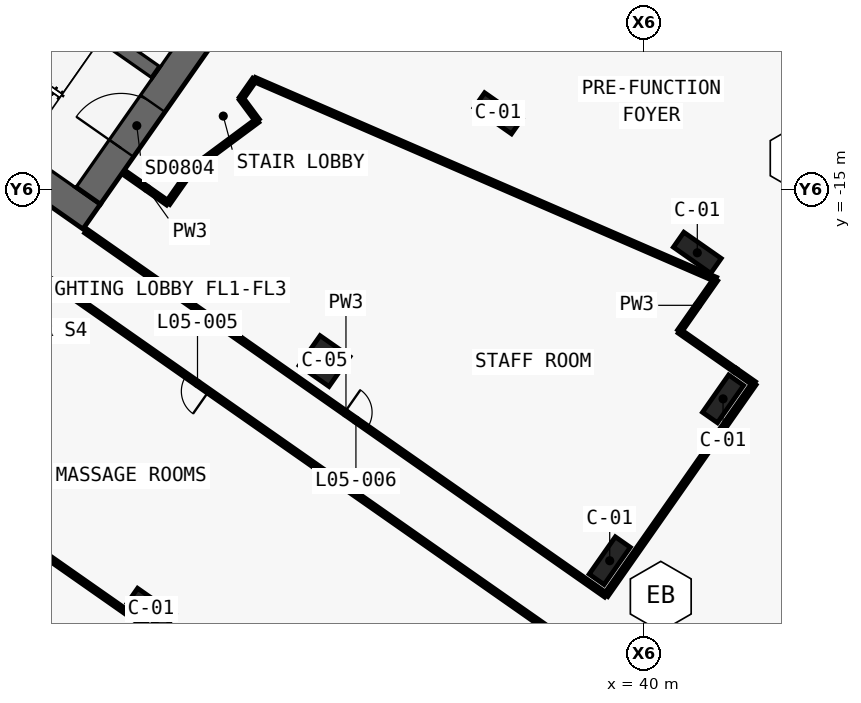
"""IFC4 building model, lengths in metres.
Left out: names, types, materials, properties, quantities, classifications, styles, units other than length and angle.
Written with IfcOpenShell. Run it as: python <this file> out.ifc"""

import sys

from ifc_helpers import new_model, si_unit, direction, frame, frame_2d, origin, origin_2d, place, context, subcontext, project, spatial, polyline, rectangle, outline, extrude, element, fill, save


model = new_model("IFC4")
c1 = context("Model", 3, precision=1e-05, world=origin(), true_north=direction((0.0, 1.0)))
c2 = subcontext(c1, "Body", "Model", "MODEL_VIEW")
j1 = project(units=[si_unit("LENGTHUNIT", "METRE"), si_unit("PLANEANGLEUNIT", "RADIAN")], contexts=[c1])
p1 = place(None, origin())
s1 = spatial("IfcSite", under=j1, at=p1, CompositionType="ELEMENT")
p2 = place(p1, origin())
s2 = spatial("IfcBuilding", under=s1, at=p2, CompositionType="ELEMENT")
p3 = place(p2, frame((0.0, 0.0, 37.5)))
s3 = spatial("IfcBuildingStorey", under=s2, at=p3, CompositionType="ELEMENT", Elevation=37.5)
p4 = place(p3, frame((-0.037, -0.585, 0.0), z_axis=(0.0, 0.0, 1.0), x_axis=(0.819157152511, -0.573569140985, 0.0)))
e1 = element("IfcWall", 1, at=p4, inside=s3, PredefinedType="SHEAR", context=c2, shape_type="SweptSolid", body=[
    extrude(outline(polyline([(26.695, 0.5), (0.0, 0.5), (0.7, -0.5), (26.695, -0.5), (26.695, 0.5)])), origin(), (0.0, 0.0, 1.0), 5.5),
])
p5 = place(p4, frame((6.695, 0.0, 0.0)))
e2 = element("IfcOpeningElement", 2, at=p5, cuts=e1, PredefinedType="OPENING", context=c2, shape_type="SweptSolid", body=[
    extrude(rectangle(XDim=1.5, YDim=2.1, at=frame_2d((0.75, 1.05))), frame((0.0, 0.51, 0.0), z_axis=(0.0, -1.0, 0.0), x_axis=(1.0, 0.0, 0.0)), (0.0, 0.0, 1.0), 1.02),
])
p6 = place(p4, frame((12.445, 0.0, 0.0)))
e3 = element("IfcOpeningElement", 3, at=p6, cuts=e1, PredefinedType="OPENING", context=c2, shape_type="SweptSolid", body=[
    extrude(rectangle(XDim=1.5, YDim=2.1, at=frame_2d((0.75, 1.05))), frame((0.0, 0.51, 0.0), z_axis=(0.0, -1.0, 0.0), x_axis=(1.0, 0.0, 0.0)), (0.0, 0.0, 1.0), 1.02),
])
p7 = place(p3, frame((21.708, -15.2, 0.0), z_axis=(0.0, 0.0, 1.0), x_axis=(0.573576324356, 0.819152122709, 0.0)))
e4 = element("IfcWall", 4, at=p7, inside=s3, PredefinedType="SHEAR", context=c2, shape_type="SweptSolid", body=[
    extrude(outline(polyline([(9.2, 0.5), (0.0, 0.5), (0.0, -0.5), (9.2, -0.5), (9.2, 0.5)])), origin(), (0.0, 0.0, 1.0), 5.5),
])
p8 = place(p7, frame((6.1, 0.0, 0.0)))
e5 = element("IfcOpeningElement", 5, at=p8, cuts=e4, PredefinedType="OPENING", context=c2, shape_type="SweptSolid", body=[
    extrude(rectangle(XDim=1.8, YDim=2.1, at=frame_2d((0.9, 1.05))), frame((0.0, 0.51, 0.0), z_axis=(0.0, -1.0, 0.0), x_axis=(1.0, 0.0, 0.0)), (0.0, 0.0, 1.0), 1.02),
])
p9 = place(p7, frame((1.9, 0.0, 0.0)))
e6 = element("IfcOpeningElement", 6, at=p9, cuts=e4, PredefinedType="OPENING", context=c2, shape_type="SweptSolid", body=[
    extrude(rectangle(XDim=1.8, YDim=2.1, at=frame_2d((0.9, 1.05))), frame((0.0, 0.51, 0.0), z_axis=(0.0, -1.0, 0.0), x_axis=(1.0, 0.0, 0.0)), (0.0, 0.0, 1.0), 1.02),
])
p10 = place(p3, frame((2.638, 3.768, 0.0), z_axis=(0.0, 0.0, 1.0), x_axis=(0.819148977158, -0.573580816643, 0.0)))
e7 = element("IfcWall", 7, at=p10, inside=s3, PredefinedType="SHEAR", context=c2, shape_type="SweptSolid", body=[
    extrude(outline(polyline([(0.0, 0.25), (0.0, -0.25), (26.0, -0.25), (26.0, 0.25), (0.0, 0.25)])), origin(), (0.0, 0.0, 1.0), 5.5),
])
p11 = place(p10, frame((9.637, 0.0, 0.0)))
e8 = element("IfcOpeningElement", 8, at=p11, cuts=e7, PredefinedType="OPENING", context=c2, shape_type="SweptSolid", body=[
    extrude(rectangle(XDim=1.2, YDim=2.1, at=frame_2d((0.6, 1.05))), frame((0.0, 0.26, 0.0), z_axis=(0.0, -1.0, 0.0), x_axis=(1.0, 0.0, 0.0)), (0.0, 0.0, 1.0), 0.52),
])
p12 = place(p10, frame((11.812, 0.0, 0.0)))
e9 = element("IfcOpeningElement", 9, at=p12, cuts=e7, PredefinedType="OPENING", context=c2, shape_type="SweptSolid", body=[
    extrude(rectangle(XDim=1.2, YDim=2.1, at=frame_2d((0.6, 1.05))), frame((0.0, 0.26, 0.0), z_axis=(0.0, -1.0, 0.0), x_axis=(1.0, 0.0, 0.0)), (0.0, 0.0, 1.0), 0.52),
])
p13 = place(p10, frame((13.988, 0.0, 0.0)))
e10 = element("IfcOpeningElement", 10, at=p13, cuts=e7, PredefinedType="OPENING", context=c2, shape_type="SweptSolid", body=[
    extrude(rectangle(XDim=1.2, YDim=2.1, at=frame_2d((0.6, 1.05))), frame((0.0, 0.26, 0.0), z_axis=(0.0, -1.0, 0.0), x_axis=(1.0, 0.0, 0.0)), (0.0, 0.0, 1.0), 0.52),
])
p14 = place(p10, frame((16.262, 0.0, 0.0)))
e11 = element("IfcOpeningElement", 11, at=p14, cuts=e7, PredefinedType="OPENING", context=c2, shape_type="SweptSolid", body=[
    extrude(rectangle(XDim=1.0, YDim=2.1, at=frame_2d((0.5, 1.05))), frame((0.0, 0.26, 0.0), z_axis=(0.0, -1.0, 0.0), x_axis=(1.0, 0.0, 0.0)), (0.0, 0.0, 1.0), 0.52),
])
for number, where, z_axis, x_axis in (
    (12, (23.782, -28.799, 0.0), (0.0, 0.0, 1.0), (0.819, -0.574, 0.0)),
    (13, (35.197, -12.498, 0.0), (0.0, 0.0, 1.0), (0.819, -0.574, 0.0)),
    (14, (41.75, -17.087, 0.0), (0.0, 0.0, 1.0), (0.819, -0.574, 0.0)),
    (15, (38.869, -27.216, 0.0), (0.0, 0.0, 1.0), (0.574, 0.819, 0.0)),
    (16, (42.597, -21.892, 0.0), (0.0, 0.0, 1.0), (0.574, 0.819, 0.0)),
):
    element("IfcColumn", number, at=place(p3, frame(where, z_axis=z_axis, x_axis=x_axis)), inside=s3, PredefinedType="COLUMN", context=c2, shape_type="SweptSolid", body=[
        extrude(rectangle(XDim=1.5, YDim=0.6, at=origin_2d()), origin(), (0.0, 0.0, 1.0), 5.5),
    ])
p15 = place(p3, frame((29.49, -20.649, 0.0), z_axis=(0.0, 0.0, 1.0), x_axis=(0.819152044289, -0.573576436351, 0.0)))
e17 = element("IfcColumn", 17, at=p15, inside=s3, PredefinedType="COLUMN", context=c2, shape_type="SweptSolid", body=[
    extrude(rectangle(XDim=1.2, YDim=1.2, at=origin_2d()), origin(), (0.0, 0.0, 1.0), 5.5),
])
p16 = place(p3, frame((21.642, -16.375, 0.0), z_axis=(0.0, 0.0, 1.0), x_axis=(0.819148965066, -0.573580833911, 0.0)))
e18 = element("IfcWall", 18, at=p16, inside=s3, PredefinedType="PARTITIONING", context=c2, shape_type="SweptSolid", body=[
    extrude(rectangle(XDim=20.88, YDim=0.15, at=frame_2d((10.44, 0.0))), origin(), (0.0, 0.0, 1.0), 3.68),
])
p17 = place(p16, frame((10.39, 0.0, 0.0)))
e19 = element("IfcOpeningElement", 19, at=p17, cuts=e18, PredefinedType="OPENING", context=c2, shape_type="SweptSolid", body=[
    extrude(rectangle(XDim=0.9, YDim=2.1, at=frame_2d((0.45, 1.05))), frame((0.0, 0.085, 0.0), z_axis=(0.0, -1.0, 0.0), x_axis=(1.0, 0.0, 0.0)), (0.0, 0.0, 1.0), 0.17),
])
p18 = place(p3, frame((37.599, -29.989, 0.0), z_axis=(0.0, 0.0, 1.0), x_axis=(-0.819154688631, 0.57357265982, 0.0)))
e20 = element("IfcWall", 20, at=p18, inside=s3, PredefinedType="PARTITIONING", context=c2, shape_type="SweptSolid", body=[
    extrude(rectangle(XDim=30.002, YDim=0.15, at=frame_2d((15.001, 0.0))), origin(), (0.0, 0.0, 1.0), 3.68),
])
p19 = place(p18, frame((14.551, 0.0, 0.0)))
e21 = element("IfcOpeningElement", 21, at=p19, cuts=e20, PredefinedType="OPENING", context=c2, shape_type="SweptSolid", body=[
    extrude(rectangle(XDim=0.9, YDim=2.1, at=frame_2d((0.45, 1.05))), frame((0.0, 0.085, 0.0), z_axis=(0.0, -1.0, 0.0), x_axis=(1.0, 0.0, 0.0)), (0.0, 0.0, 1.0), 0.17),
])
p20 = place(p3, frame((42.357, -17.962, 0.0), z_axis=(0.0, 0.0, 1.0), x_axis=(-0.573533201177, -0.819182316183, 0.0)))
e22 = element("IfcWall", 22, at=p20, inside=s3, PredefinedType="PARTITIONING", context=c2, shape_type="SweptSolid", body=[
    extrude(rectangle(XDim=2.081, YDim=0.15, at=frame_2d((1.041, 0.0))), origin(), (0.0, 0.0, 1.0), 3.88),
])
p21 = place(p3, frame((41.164, -19.667, 0.0), z_axis=(0.0, 0.0, 1.0), x_axis=(0.81912956014, -0.573608545704, 0.0)))
e23 = element("IfcWall", 23, at=p21, inside=s3, PredefinedType="PARTITIONING", context=c2, shape_type="SweptSolid", body=[
    extrude(rectangle(XDim=2.241, YDim=0.15, at=frame_2d((1.121, 0.0))), origin(), (0.0, 0.0, 1.0), 3.88),
])
p22 = place(p3, frame((42.998, -20.952, 0.0), z_axis=(0.0, 0.0, 1.0), x_axis=(0.819141432686, -0.573591590992, 0.0)))
e24 = element("IfcWall", 24, at=p22, inside=s3, PredefinedType="PARTITIONING", context=c2, shape_type="SweptSolid", body=[
    extrude(rectangle(XDim=0.76, YDim=0.15, at=frame_2d((0.38, 0.0))), origin(), (0.0, 0.0, 1.0), 5.1),
])
p23 = place(p3, frame((43.621, -21.388, 0.0), z_axis=(0.0, 0.0, 1.0), x_axis=(-0.57357799764, -0.819150951061, 0.0)))
e25 = element("IfcWall", 25, at=p23, inside=s3, PredefinedType="PARTITIONING", context=c2, shape_type="SweptSolid", body=[
    extrude(rectangle(XDim=8.5, YDim=0.15, at=frame_2d((4.25, 0.0))), origin(), (0.0, 0.0, 1.0), 5.1),
])
p24 = place(p3, frame((26.746, -12.014, 0.0), z_axis=(0.0, 0.0, 1.0), x_axis=(0.573761975376, 0.819022097146, 0.0)))
e26 = element("IfcWall", 26, at=p24, inside=s3, PredefinedType="PARTITIONING", context=c2, shape_type="SweptSolid", body=[
    extrude(rectangle(XDim=0.765, YDim=0.15, at=frame_2d((0.383, 0.0))), origin(), (0.0, 0.0, 1.0), 5.1),
])
p25 = place(p3, frame((27.185, -11.387, 0.0), z_axis=(0.0, 0.0, 1.0), x_axis=(0.917531384635, -0.397663372979, 0.0)))
e27 = element("IfcWall", 27, at=p25, inside=s3, PredefinedType="PARTITIONING", context=c2, shape_type="SweptSolid", body=[
    extrude(rectangle(XDim=16.536, YDim=0.15, at=frame_2d((8.268, 0.0))), origin(), (0.0, 0.0, 1.0), 3.68),
])
p26 = place(p3, frame((22.961, -14.49, 0.0), z_axis=(0.0, 0.0, 1.0), x_axis=(0.819109000826, -0.573637903879, 0.0)))
e28 = element("IfcWall", 28, at=p26, inside=s3, PredefinedType="PARTITIONING", context=c2, shape_type="SweptSolid", body=[
    extrude(rectangle(XDim=1.68, YDim=0.15, at=frame_2d((0.84, 0.0))), origin(), (0.0, 0.0, 1.0), 5.1),
])
p27 = place(p3, frame((24.337, -15.454, 0.0), z_axis=(0.0, 0.0, 1.0), x_axis=(0.573571252353, 0.819155674139, 0.0)))
e29 = element("IfcWall", 29, at=p27, inside=s3, PredefinedType="PARTITIONING", context=c2, shape_type="SweptSolid", body=[
    extrude(rectangle(XDim=1.354, YDim=0.15, at=frame_2d((0.677, 0.0))), origin(), (0.0, 0.0, 1.0), 5.1),
])
p28 = place(p3, frame((25.114, -14.345, 0.0), z_axis=(0.0, 0.0, 1.0), x_axis=(0.803211070557, 0.595694532571, 0.0)))
e30 = element("IfcWall", 30, at=p28, inside=s3, PredefinedType="PARTITIONING", context=c2, shape_type="SweptSolid", body=[
    extrude(rectangle(XDim=2.7, YDim=0.15, at=frame_2d((1.35, 0.0))), origin(), (0.0, 0.0, 1.0), 5.1),
])
p29 = place(p3, frame((27.282, -12.737, 0.0), z_axis=(0.0, 0.0, 1.0), x_axis=(-0.595869495235, 0.803081281471, 0.0)))
e31 = element("IfcWall", 31, at=p29, inside=s3, PredefinedType="PARTITIONING", context=c2, shape_type="SweptSolid", body=[
    extrude(rectangle(XDim=0.9, YDim=0.15, at=frame_2d((0.45, 0.0))), origin(), (0.0, 0.0, 1.0), 5.1),
])
p30 = place(p3, frame((30.839, -34.412, 0.0), z_axis=(0.0, 0.0, 1.0), x_axis=(-0.819153188106, 0.573574802808, 0.0)))
e32 = element("IfcWall", 32, at=p30, inside=s3, PredefinedType="PARTITIONING", context=c2, shape_type="SweptSolid", body=[
    extrude(rectangle(XDim=25.351, YDim=0.15, at=frame_2d((12.675, 0.0))), origin(), (0.0, 0.0, 1.0), 5.1),
])
p31 = place(p9, origin())
e33 = element("IfcDoor", 33, at=p31, inside=s3, OperationType="DOUBLE_DOOR_SINGLE_SWING", PredefinedType="DOOR", context=c2, shape_type="SweptSolid", body=[
    extrude(rectangle(XDim=1.8, YDim=2.1, at=frame_2d((0.9, 1.05))), frame((0.0, 0.025, 0.0), z_axis=(0.0, -1.0, 0.0), x_axis=(1.0, 0.0, 0.0)), (0.0, 0.0, 1.0), 0.05),
])
fill(e6, e33)
p32 = place(p19, origin())
e34 = element("IfcDoor", 34, at=p32, inside=s3, OperationType="SINGLE_SWING_LEFT", PredefinedType="DOOR", context=c2, shape_type="SweptSolid", body=[
    extrude(rectangle(XDim=0.9, YDim=2.1, at=frame_2d((0.45, 1.05))), frame((0.0, 0.025, 0.0), z_axis=(0.0, -1.0, 0.0), x_axis=(1.0, 0.0, 0.0)), (0.0, 0.0, 1.0), 0.05),
])
fill(e21, e34)
p33 = place(p17, origin())
e35 = element("IfcDoor", 35, at=p33, inside=s3, OperationType="SINGLE_SWING_RIGHT", PredefinedType="DOOR", context=c2, shape_type="SweptSolid", body=[
    extrude(rectangle(XDim=0.9, YDim=2.1, at=frame_2d((0.45, 1.05))), frame((0.0, 0.025, 0.0), z_axis=(0.0, -1.0, 0.0), x_axis=(1.0, 0.0, 0.0)), (0.0, 0.0, 1.0), 0.05),
])
fill(e19, e35)
save(model, sys.argv[1])
